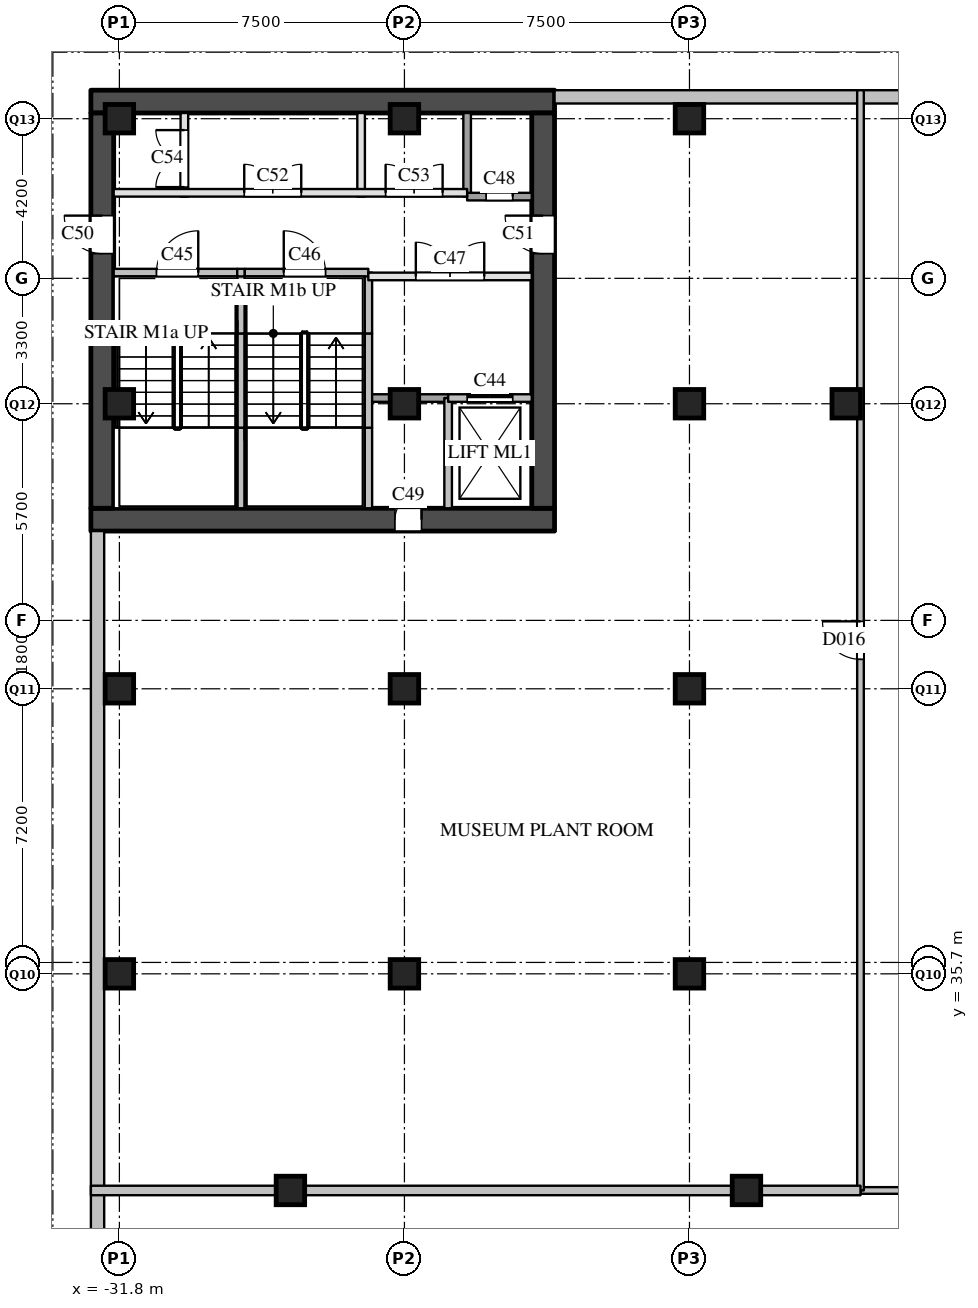
"""IFC4 building model, lengths in metres.
Left out: names, types, materials, properties, quantities, classifications, styles, units other than length and angle.
Written with IfcOpenShell. Run it as: python <this file> out.ifc"""

import sys

from ifc_helpers import new_model, si_unit, direction, frame, frame_2d, origin, origin_2d, place, context, subcontext, project, spatial, rectangle, extrude, element, fill, save


model = new_model("IFC4")
c1 = context("Model", 3, precision=1e-05, world=origin(), true_north=direction((0.0, 1.0)))
c2 = subcontext(c1, "Body", "Model", "MODEL_VIEW")
j1 = project(units=[si_unit("LENGTHUNIT", "METRE"), si_unit("PLANEANGLEUNIT", "RADIAN")], contexts=[c1])
p1 = place(None, origin())
s1 = spatial("IfcSite", under=j1, at=p1, CompositionType="ELEMENT")
p2 = place(p1, origin())
s2 = spatial("IfcBuilding", under=s1, at=p2, CompositionType="ELEMENT")
p3 = place(p2, frame((0.0, 0.0, -6.0)))
s3 = spatial("IfcBuildingStorey", under=s2, at=p3, CompositionType="ELEMENT", Elevation=-6.0)
p4 = place(p3, frame((-32.375, -20.95, 0.0), z_axis=(0.0, 0.0, 1.0), x_axis=(0.0, 1.0, 0.0)))
e1 = element("IfcWall", 1, at=p4, inside=s3, PredefinedType="SOLIDWALL", context=c2, shape_type="SweptSolid", body=[
    extrude(rectangle(XDim=68.3, YDim=0.35, at=frame_2d((34.15, 0.0))), origin(), (0.0, 0.0, 1.0), 5.59),
])
p5 = place(p3, frame((-20.35, 58.775, 0.0), z_axis=(0.0, 0.0, 1.0), x_axis=(1.0, 0.0, 0.0)))
e2 = element("IfcWall", 2, at=p5, inside=s3, PredefinedType="SOLIDWALL", context=c2, shape_type="SweptSolid", body=[
    extrude(rectangle(XDim=19.3, YDim=0.35, at=frame_2d((9.65, 0.0))), origin(), (0.0, 0.0, 1.0), 5.59),
])
for number, where, z_axis, x_axis in (
    (3, (-31.8, 35.7, 0.0), (0.0, 0.0, 1.0), (1.0, 0.0, 0.0)),
    (4, (-31.8, 43.2, 0.0), (0.0, 0.0, 1.0), (1.0, 0.0, 0.0)),
    (5, (-31.8, 50.7, 0.0), (0.0, 0.0, 1.0), (1.0, 0.0, 0.0)),
    (6, (-31.8, 58.2, 0.0), (0.0, 0.0, 1.0), (1.0, 0.0, 0.0)),
    (7, (-24.3, 35.7, 0.0), (0.0, 0.0, 1.0), (1.0, 0.0, 0.0)),
    (8, (-24.3, 43.2, 0.0), (0.0, 0.0, 1.0), (1.0, 0.0, 0.0)),
    (9, (-24.3, 50.7, 0.0), (0.0, 0.0, 1.0), (1.0, 0.0, 0.0)),
    (10, (-24.3, 58.2, 0.0), (0.0, 0.0, 1.0), (1.0, 0.0, 0.0)),
    (11, (-16.8, 35.7, 0.0), (0.0, 0.0, 1.0), (1.0, 0.0, 0.0)),
    (12, (-16.8, 43.2, 0.0), (0.0, 0.0, 1.0), (1.0, 0.0, 0.0)),
    (13, (-16.8, 50.7, 0.0), (0.0, 0.0, 1.0), (1.0, 0.0, 0.0)),
    (14, (-16.8, 58.2, 0.0), (0.0, 0.0, 1.0), (1.0, 0.0, 0.0)),
    (15, (-15.3, 30.0, 0.0), (0.0, 0.0, 1.0), (1.0, 0.0, 0.0)),
    (16, (-27.3, 30.0, 0.0), (0.0, 0.0, 1.0), (1.0, 0.0, 0.0)),
    (17, (-12.675, 50.7, 0.0), (0.0, 0.0, 1.0), (1.0, 0.0, 0.0)),
):
    element("IfcColumn", number, at=place(p3, frame(where, z_axis=z_axis, x_axis=x_axis)), inside=s3, PredefinedType="COLUMN", context=c2, shape_type="SweptSolid", body=[
        extrude(rectangle(XDim=0.75, YDim=0.75, at=origin_2d()), origin(), (0.0, 0.0, 1.0), 6.0),
    ])
p6 = place(p3, frame((-32.55, 47.65, 0.0), z_axis=(0.0, 0.0, 1.0), x_axis=(1.0, 0.0, 0.0)))
e18 = element("IfcWall", 18, at=p6, inside=s3, PredefinedType="SHEAR", context=c2, shape_type="SweptSolid", body=[
    extrude(rectangle(XDim=12.2, YDim=0.6, at=frame_2d((6.1, 0.0))), origin(), (0.0, 0.0, 1.0), 5.59),
])
p7 = place(p6, frame((8.0, 0.0, 0.0)))
e19 = element("IfcOpeningElement", 19, at=p7, cuts=e18, PredefinedType="OPENING", context=c2, shape_type="SweptSolid", body=[
    extrude(rectangle(XDim=0.7, YDim=2.1, at=frame_2d((0.35, 1.05))), frame((0.0, 0.31, 0.0), z_axis=(0.0, -1.0, 0.0), x_axis=(1.0, 0.0, 0.0)), (0.0, 0.0, 1.0), 0.62),
])
p8 = place(p3, frame((-32.55, 58.65, 0.0), z_axis=(0.0, 0.0, 1.0), x_axis=(1.0, 0.0, 0.0)))
e20 = element("IfcWall", 20, at=p8, inside=s3, PredefinedType="SHEAR", context=c2, shape_type="SweptSolid", body=[
    extrude(rectangle(XDim=12.2, YDim=0.6, at=frame_2d((6.1, 0.0))), origin(), (0.0, 0.0, 1.0), 5.59),
])
p9 = place(p3, frame((-32.25, 47.95, 0.0), z_axis=(0.0, 0.0, 1.0), x_axis=(0.0, 1.0, 0.0)))
e21 = element("IfcWall", 21, at=p9, inside=s3, PredefinedType="SHEAR", context=c2, shape_type="SweptSolid", body=[
    extrude(rectangle(XDim=10.4, YDim=0.6, at=frame_2d((5.2, 0.0))), origin(), (0.0, 0.0, 1.0), 5.59),
])
p10 = place(p9, frame((6.7, 0.0, 0.0)))
e22 = element("IfcOpeningElement", 22, at=p10, cuts=e21, PredefinedType="OPENING", context=c2, shape_type="SweptSolid", body=[
    extrude(rectangle(XDim=1.0, YDim=2.1, at=frame_2d((0.5, 1.05))), frame((0.0, 0.31, 0.0), z_axis=(0.0, -1.0, 0.0), x_axis=(1.0, 0.0, 0.0)), (0.0, 0.0, 1.0), 0.62),
])
p11 = place(p3, frame((-20.65, 47.95, 0.0), z_axis=(0.0, 0.0, 1.0), x_axis=(0.0, 1.0, 0.0)))
e23 = element("IfcWall", 23, at=p11, inside=s3, PredefinedType="SHEAR", context=c2, shape_type="SweptSolid", body=[
    extrude(rectangle(XDim=10.4, YDim=0.6, at=frame_2d((5.2, 0.0))), origin(), (0.0, 0.0, 1.0), 5.59),
])
p12 = place(p11, frame((6.7, 0.0, 0.0)))
e24 = element("IfcOpeningElement", 24, at=p12, cuts=e23, PredefinedType="OPENING", context=c2, shape_type="SweptSolid", body=[
    extrude(rectangle(XDim=1.0, YDim=2.1, at=frame_2d((0.5, 1.05))), frame((0.0, 0.31, 0.0), z_axis=(0.0, -1.0, 0.0), x_axis=(1.0, 0.0, 0.0)), (0.0, 0.0, 1.0), 0.62),
])
p13 = place(p3, frame((-30.09, 56.15, 0.0), z_axis=(0.0, 0.0, 1.0), x_axis=(0.0, 1.0, 0.0)))
e25 = element("IfcWall", 25, at=p13, inside=s3, PredefinedType="PARTITIONING", context=c2, shape_type="SweptSolid", body=[
    extrude(rectangle(XDim=2.2, YDim=0.2, at=frame_2d((1.1, 0.0))), origin(), (0.0, 0.0, 1.0), 5.59),
])
p14 = place(p13, frame((0.25, 0.0, 0.0)))
e26 = element("IfcOpeningElement", 26, at=p14, cuts=e25, PredefinedType="OPENING", context=c2, shape_type="SweptSolid", body=[
    extrude(rectangle(XDim=1.5, YDim=2.1, at=frame_2d((0.75, 1.05))), frame((0.0, 0.11, 0.0), z_axis=(0.0, -1.0, 0.0), x_axis=(1.0, 0.0, 0.0)), (0.0, 0.0, 1.0), 0.22),
])
p15 = place(p3, frame((-28.6, 47.95, 0.0), z_axis=(0.0, 0.0, 1.0), x_axis=(0.0, 1.0, 0.0)))
e27 = element("IfcWall", 27, at=p15, inside=s3, PredefinedType="SOLIDWALL", context=c2, shape_type="SweptSolid", body=[
    extrude(rectangle(XDim=2.12, YDim=0.2, at=frame_2d((1.06, 0.0))), origin(), (0.0, 0.0, 1.0), 5.59),
])
p16 = place(p3, frame((-28.6, 50.07, 0.0), z_axis=(0.0, 0.0, 1.0), x_axis=(0.0, 1.0, 0.0)))
e28 = element("IfcWall", 28, at=p16, inside=s3, PredefinedType="SOLIDWALL", context=c2, shape_type="SweptSolid", body=[
    extrude(rectangle(XDim=2.48, YDim=0.2, at=frame_2d((1.24, 0.0))), origin(), (0.0, 0.0, 1.0), 5.59),
])
p17 = place(p3, frame((-28.6, 52.55, 0.0), z_axis=(0.0, 0.0, 1.0), x_axis=(0.0, 1.0, 0.0)))
e29 = element("IfcWall", 29, at=p17, inside=s3, PredefinedType="SOLIDWALL", context=c2, shape_type="SweptSolid", body=[
    extrude(rectangle(XDim=1.6, YDim=0.2, at=frame_2d((0.8, 0.0))), origin(), (0.0, 0.0, 1.0), 5.59),
])
p18 = place(p3, frame((-25.44, 56.15, 0.0), z_axis=(0.0, 0.0, 1.0), x_axis=(0.0, 1.0, 0.0)))
e30 = element("IfcWall", 30, at=p18, inside=s3, PredefinedType="PARTITIONING", context=c2, shape_type="SweptSolid", body=[
    extrude(rectangle(XDim=2.2, YDim=0.2, at=frame_2d((1.1, 0.0))), origin(), (0.0, 0.0, 1.0), 5.59),
])
p19 = place(p3, frame((-25.25, 47.95, 0.0), z_axis=(0.0, 0.0, 1.0), x_axis=(0.0, 1.0, 0.0)))
e31 = element("IfcWall", 31, at=p19, inside=s3, PredefinedType="SOLIDWALL", context=c2, shape_type="SweptSolid", body=[
    extrude(rectangle(XDim=2.12, YDim=0.2, at=frame_2d((1.06, 0.0))), origin(), (0.0, 0.0, 1.0), 5.59),
])
p20 = place(p3, frame((-25.25, 50.07, 0.0), z_axis=(0.0, 0.0, 1.0), x_axis=(0.0, 1.0, 0.0)))
e32 = element("IfcWall", 32, at=p20, inside=s3, PredefinedType="SOLIDWALL", context=c2, shape_type="SweptSolid", body=[
    extrude(rectangle(XDim=2.48, YDim=0.2, at=frame_2d((1.24, 0.0))), origin(), (0.0, 0.0, 1.0), 5.59),
])
p21 = place(p3, frame((-25.25, 52.55, 0.0), z_axis=(0.0, 0.0, 1.0), x_axis=(0.0, 1.0, 0.0)))
e33 = element("IfcWall", 33, at=p21, inside=s3, PredefinedType="SOLIDWALL", context=c2, shape_type="SweptSolid", body=[
    extrude(rectangle(XDim=1.6, YDim=0.2, at=frame_2d((0.8, 0.0))), origin(), (0.0, 0.0, 1.0), 5.59),
])
p22 = place(p3, frame((-23.15, 47.95, 0.0), z_axis=(0.0, 0.0, 1.0), x_axis=(0.0, 1.0, 0.0)))
e34 = element("IfcWall", 34, at=p22, inside=s3, PredefinedType="SOLIDWALL", context=c2, shape_type="SweptSolid", body=[
    extrude(rectangle(XDim=2.9, YDim=0.2, at=frame_2d((1.45, 0.0))), origin(), (0.0, 0.0, 1.0), 5.59),
])
p23 = place(p3, frame((-22.65, 56.15, 0.0), z_axis=(0.0, 0.0, 1.0), x_axis=(0.0, 1.0, 0.0)))
e35 = element("IfcWall", 35, at=p23, inside=s3, PredefinedType="SOLIDWALL", context=c2, shape_type="SweptSolid", body=[
    extrude(rectangle(XDim=2.2, YDim=0.2, at=frame_2d((1.1, 0.0))), origin(), (0.0, 0.0, 1.0), 5.59),
])
p24 = place(p3, frame((-23.15, 50.85, 0.0), z_axis=(0.0, 0.0, 1.0), x_axis=(1.0, 0.0, 0.0)))
e36 = element("IfcWall", 36, at=p24, inside=s3, PredefinedType="SOLIDWALL", context=c2, shape_type="SweptSolid", body=[
    extrude(rectangle(XDim=2.2, YDim=0.2, at=frame_2d((1.1, 0.0))), origin(), (0.0, 0.0, 1.0), 5.59),
])
p25 = place(p24, frame((0.5, 0.0, 0.0)))
e37 = element("IfcOpeningElement", 37, at=p25, cuts=e36, PredefinedType="OPENING", context=c2, shape_type="SweptSolid", body=[
    extrude(rectangle(XDim=1.2, YDim=2.1, at=frame_2d((0.6, 1.05))), frame((0.0, 0.11, 0.0), z_axis=(0.0, -1.0, 0.0), x_axis=(1.0, 0.0, 0.0)), (0.0, 0.0, 1.0), 0.22),
])
p26 = place(p3, frame((-25.25, 50.85, 0.0), z_axis=(0.0, 0.0, 1.0), x_axis=(1.0, 0.0, 0.0)))
e38 = element("IfcWall", 38, at=p26, inside=s3, PredefinedType="SOLIDWALL", context=c2, shape_type="SweptSolid", body=[
    extrude(rectangle(XDim=2.1, YDim=0.2, at=frame_2d((1.05, 0.0))), origin(), (0.0, 0.0, 1.0), 5.59),
])
p27 = place(p3, frame((-25.25, 54.05, 0.0), z_axis=(0.0, 0.0, 1.0), x_axis=(1.0, 0.0, 0.0)))
e39 = element("IfcWall", 39, at=p27, inside=s3, PredefinedType="PARTITIONING", context=c2, shape_type="SweptSolid", body=[
    extrude(rectangle(XDim=4.3, YDim=0.2, at=frame_2d((2.15, 0.0))), origin(), (0.0, 0.0, 1.0), 5.59),
])
p28 = place(p27, frame((1.25, 0.0, 0.0)))
e40 = element("IfcOpeningElement", 40, at=p28, cuts=e39, PredefinedType="OPENING", context=c2, shape_type="SweptSolid", body=[
    extrude(rectangle(XDim=1.8, YDim=2.1, at=frame_2d((0.9, 1.05))), frame((0.0, 0.11, 0.0), z_axis=(0.0, -1.0, 0.0), x_axis=(1.0, 0.0, 0.0)), (0.0, 0.0, 1.0), 0.22),
])
p29 = place(p3, frame((-31.95, 54.15, 0.0), z_axis=(0.0, 0.0, 1.0), x_axis=(1.0, 0.0, 0.0)))
e41 = element("IfcWall", 41, at=p29, inside=s3, PredefinedType="SOLIDWALL", context=c2, shape_type="SweptSolid", body=[
    extrude(rectangle(XDim=3.25, YDim=0.2, at=frame_2d((1.625, 0.0))), origin(), (0.0, 0.0, 1.0), 5.59),
])
p30 = place(p29, frame((1.125, 0.0, 0.0)))
e42 = element("IfcOpeningElement", 42, at=p30, cuts=e41, PredefinedType="OPENING", context=c2, shape_type="SweptSolid", body=[
    extrude(rectangle(XDim=1.1, YDim=2.1, at=frame_2d((0.55, 1.05))), frame((0.0, 0.11, 0.0), z_axis=(0.0, -1.0, 0.0), x_axis=(1.0, 0.0, 0.0)), (0.0, 0.0, 1.0), 0.22),
])
p31 = place(p3, frame((-28.7, 54.15, 0.0), z_axis=(0.0, 0.0, 1.0), x_axis=(1.0, 0.0, 0.0)))
e43 = element("IfcWall", 43, at=p31, inside=s3, PredefinedType="SOLIDWALL", context=c2, shape_type="SweptSolid", body=[
    extrude(rectangle(XDim=0.2, YDim=0.2, at=frame_2d((0.1, 0.0))), origin(), (0.0, 0.0, 1.0), 5.59),
])
p32 = place(p3, frame((-28.5, 54.15, 0.0), z_axis=(0.0, 0.0, 1.0), x_axis=(1.0, 0.0, 0.0)))
e44 = element("IfcWall", 44, at=p32, inside=s3, PredefinedType="SOLIDWALL", context=c2, shape_type="SweptSolid", body=[
    extrude(rectangle(XDim=3.25, YDim=0.2, at=frame_2d((1.625, 0.0))), origin(), (0.0, 0.0, 1.0), 5.59),
])
p33 = place(p32, frame((1.025, 0.0, 0.0)))
e45 = element("IfcOpeningElement", 45, at=p33, cuts=e44, PredefinedType="OPENING", context=c2, shape_type="SweptSolid", body=[
    extrude(rectangle(XDim=1.1, YDim=2.1, at=frame_2d((0.55, 1.05))), frame((0.0, 0.11, 0.0), z_axis=(0.0, -1.0, 0.0), x_axis=(1.0, 0.0, 0.0)), (0.0, 0.0, 1.0), 0.22),
])
p34 = place(p3, frame((-31.95, 56.25, 0.0), z_axis=(0.0, 0.0, 1.0), x_axis=(1.0, 0.0, 0.0)))
e46 = element("IfcWall", 46, at=p34, inside=s3, PredefinedType="PARTITIONING", context=c2, shape_type="SweptSolid", body=[
    extrude(rectangle(XDim=9.3, YDim=0.2, at=frame_2d((4.65, 0.0))), origin(), (0.0, 0.0, 1.0), 5.59),
])
p35 = place(p34, frame((3.435, 0.0, 0.0)))
e47 = element("IfcOpeningElement", 47, at=p35, cuts=e46, PredefinedType="OPENING", context=c2, shape_type="SweptSolid", body=[
    extrude(rectangle(XDim=1.5, YDim=2.1, at=frame_2d((0.75, 1.05))), frame((0.0, 0.11, 0.0), z_axis=(0.0, -1.0, 0.0), x_axis=(1.0, 0.0, 0.0)), (0.0, 0.0, 1.0), 0.22),
])
p36 = place(p34, frame((7.155, 0.0, 0.0)))
e48 = element("IfcOpeningElement", 48, at=p36, cuts=e46, PredefinedType="OPENING", context=c2, shape_type="SweptSolid", body=[
    extrude(rectangle(XDim=1.5, YDim=2.1, at=frame_2d((0.75, 1.05))), frame((0.0, 0.11, 0.0), z_axis=(0.0, -1.0, 0.0), x_axis=(1.0, 0.0, 0.0)), (0.0, 0.0, 1.0), 0.22),
])
p37 = place(p3, frame((-22.65, 56.15, 0.0), z_axis=(0.0, 0.0, 1.0), x_axis=(1.0, 0.0, 0.0)))
e49 = element("IfcWall", 49, at=p37, inside=s3, PredefinedType="SOLIDWALL", context=c2, shape_type="SweptSolid", body=[
    extrude(rectangle(XDim=1.7, YDim=0.2, at=frame_2d((0.85, 0.0))), origin(), (0.0, 0.0, 1.0), 5.59),
])
p38 = place(p37, frame((0.5, 0.0, 0.0)))
e50 = element("IfcOpeningElement", 50, at=p38, cuts=e49, PredefinedType="OPENING", context=c2, shape_type="SweptSolid", body=[
    extrude(rectangle(XDim=0.7, YDim=2.1, at=frame_2d((0.35, 1.05))), frame((0.0, 0.11, 0.0), z_axis=(0.0, -1.0, 0.0), x_axis=(1.0, 0.0, 0.0)), (0.0, 0.0, 1.0), 0.22),
])
p39 = place(p3, frame((-12.3, 30.0, 0.0), z_axis=(0.0, 0.0, 1.0), x_axis=(1.0, 0.0, 0.0)))
e51 = element("IfcWall", 51, at=p39, inside=s3, PredefinedType="PARTITIONING", context=c2, shape_type="SweptSolid", body=[
    extrude(rectangle(XDim=8.25, YDim=0.175, at=frame_2d((4.125, 0.0))), origin(), (0.0, 0.0, 1.0), 4.79),
])
p40 = place(p3, frame((-12.3, 30.0, 0.0), z_axis=(0.0, 0.0, 1.0), x_axis=(0.0, 1.0, 0.0)))
e52 = element("IfcWall", 52, at=p40, inside=s3, PredefinedType="PARTITIONING", context=c2, shape_type="SweptSolid", body=[
    extrude(rectangle(XDim=28.95, YDim=0.175, at=frame_2d((14.475, 0.0))), origin(), (0.0, 0.0, 1.0), 4.79),
])
p41 = place(p40, frame((13.975, 0.0, 0.0)))
e53 = element("IfcOpeningElement", 53, at=p41, cuts=e52, PredefinedType="OPENING", context=c2, shape_type="SweptSolid", body=[
    extrude(rectangle(XDim=1.0, YDim=2.1, at=frame_2d((0.5, 1.05))), frame((0.0, 0.097, 0.0), z_axis=(0.0, -1.0, 0.0), x_axis=(1.0, 0.0, 0.0)), (0.0, 0.0, 1.0), 0.195),
])
p42 = place(p3, frame((-32.55, 30.0, 0.0), z_axis=(0.0, 0.0, 1.0), x_axis=(1.0, 0.0, 0.0)))
e54 = element("IfcWall", 54, at=p42, inside=s3, PredefinedType="PARTITIONING", context=c2, shape_type="SweptSolid", body=[
    extrude(rectangle(XDim=20.25, YDim=0.25, at=frame_2d((10.125, 0.0))), origin(), (0.0, 0.0, 1.0), 4.79),
])
p43 = place(p25, origin())
e55 = element("IfcDoor", 55, at=p43, inside=s3, OperationType="SLIDING_TO_LEFT", PredefinedType="DOOR", context=c2, shape_type="SweptSolid", body=[
    extrude(rectangle(XDim=1.2, YDim=2.1, at=frame_2d((0.6, 1.05))), frame((0.0, 0.025, 0.0), z_axis=(0.0, -1.0, 0.0), x_axis=(1.0, 0.0, 0.0)), (0.0, 0.0, 1.0), 0.05),
])
fill(e37, e55)
p44 = place(p30, origin())
e56 = element("IfcDoor", 56, at=p44, inside=s3, OperationType="SINGLE_SWING_RIGHT", PredefinedType="DOOR", context=c2, shape_type="SweptSolid", body=[
    extrude(rectangle(XDim=1.1, YDim=2.1, at=frame_2d((0.55, 1.05))), frame((0.0, 0.025, 0.0), z_axis=(0.0, -1.0, 0.0), x_axis=(1.0, 0.0, 0.0)), (0.0, 0.0, 1.0), 0.05),
])
fill(e42, e56)
p45 = place(p33, origin())
e57 = element("IfcDoor", 57, at=p45, inside=s3, OperationType="SINGLE_SWING_LEFT", PredefinedType="DOOR", context=c2, shape_type="SweptSolid", body=[
    extrude(rectangle(XDim=1.1, YDim=2.1, at=frame_2d((0.55, 1.05))), frame((0.0, 0.025, 0.0), z_axis=(0.0, -1.0, 0.0), x_axis=(1.0, 0.0, 0.0)), (0.0, 0.0, 1.0), 0.05),
])
fill(e45, e57)
p46 = place(p28, origin())
e58 = element("IfcDoor", 58, at=p46, inside=s3, OperationType="DOUBLE_DOOR_SINGLE_SWING", PredefinedType="DOOR", context=c2, shape_type="SweptSolid", body=[
    extrude(rectangle(XDim=1.8, YDim=2.1, at=frame_2d((0.9, 1.05))), frame((0.0, 0.025, 0.0), z_axis=(0.0, -1.0, 0.0), x_axis=(1.0, 0.0, 0.0)), (0.0, 0.0, 1.0), 0.05),
])
fill(e40, e58)
p47 = place(p38, origin())
e59 = element("IfcDoor", 59, at=p47, inside=s3, OperationType="SINGLE_SWING_RIGHT", PredefinedType="DOOR", context=c2, shape_type="SweptSolid", body=[
    extrude(rectangle(XDim=0.7, YDim=2.1, at=frame_2d((0.35, 1.05))), frame((0.0, 0.025, 0.0), z_axis=(0.0, -1.0, 0.0), x_axis=(1.0, 0.0, 0.0)), (0.0, 0.0, 1.0), 0.05),
])
fill(e50, e59)
p48 = place(p7, origin())
e60 = element("IfcDoor", 60, at=p48, inside=s3, OperationType="SINGLE_SWING_RIGHT", PredefinedType="DOOR", context=c2, shape_type="SweptSolid", body=[
    extrude(rectangle(XDim=0.7, YDim=2.1, at=frame_2d((0.35, 1.05))), frame((0.0, 0.025, 0.0), z_axis=(0.0, -1.0, 0.0), x_axis=(1.0, 0.0, 0.0)), (0.0, 0.0, 1.0), 0.05),
])
fill(e19, e60)
p49 = place(p10, origin())
e61 = element("IfcDoor", 61, at=p49, inside=s3, OperationType="SINGLE_SWING_RIGHT", PredefinedType="DOOR", context=c2, shape_type="SweptSolid", body=[
    extrude(rectangle(XDim=1.0, YDim=2.1, at=frame_2d((0.5, 1.05))), frame((0.0, 0.025, 0.0), z_axis=(0.0, -1.0, 0.0), x_axis=(1.0, 0.0, 0.0)), (0.0, 0.0, 1.0), 0.05),
])
fill(e22, e61)
p50 = place(p12, origin())
e62 = element("IfcDoor", 62, at=p50, inside=s3, OperationType="SINGLE_SWING_RIGHT", PredefinedType="DOOR", context=c2, shape_type="SweptSolid", body=[
    extrude(rectangle(XDim=1.0, YDim=2.1, at=frame_2d((0.5, 1.05))), frame((0.0, 0.025, 0.0), z_axis=(0.0, -1.0, 0.0), x_axis=(1.0, 0.0, 0.0)), (0.0, 0.0, 1.0), 0.05),
])
fill(e24, e62)
p51 = place(p35, origin())
e63 = element("IfcDoor", 63, at=p51, inside=s3, OperationType="DOUBLE_DOOR_SINGLE_SWING", PredefinedType="DOOR", context=c2, shape_type="SweptSolid", body=[
    extrude(rectangle(XDim=1.5, YDim=2.1, at=frame_2d((0.75, 1.05))), frame((0.0, 0.025, 0.0), z_axis=(0.0, -1.0, 0.0), x_axis=(1.0, 0.0, 0.0)), (0.0, 0.0, 1.0), 0.05),
])
fill(e47, e63)
p52 = place(p36, origin())
e64 = element("IfcDoor", 64, at=p52, inside=s3, OperationType="DOUBLE_DOOR_SINGLE_SWING", PredefinedType="DOOR", context=c2, shape_type="SweptSolid", body=[
    extrude(rectangle(XDim=1.5, YDim=2.1, at=frame_2d((0.75, 1.05))), frame((0.0, 0.025, 0.0), z_axis=(0.0, -1.0, 0.0), x_axis=(1.0, 0.0, 0.0)), (0.0, 0.0, 1.0), 0.05),
])
fill(e48, e64)
p53 = place(p14, origin())
e65 = element("IfcDoor", 65, at=p53, inside=s3, OperationType="DOUBLE_DOOR_SINGLE_SWING", PredefinedType="DOOR", context=c2, shape_type="SweptSolid", body=[
    extrude(rectangle(XDim=1.5, YDim=2.1, at=frame_2d((0.75, 1.05))), frame((0.0, 0.025, 0.0), z_axis=(0.0, -1.0, 0.0), x_axis=(1.0, 0.0, 0.0)), (0.0, 0.0, 1.0), 0.05),
])
fill(e26, e65)
p54 = place(p41, origin())
e66 = element("IfcDoor", 66, at=p54, inside=s3, OperationType="SINGLE_SWING_RIGHT", PredefinedType="DOOR", context=c2, shape_type="SweptSolid", body=[
    extrude(rectangle(XDim=1.0, YDim=2.1, at=frame_2d((0.5, 1.05))), frame((0.0, 0.025, 0.0), z_axis=(0.0, -1.0, 0.0), x_axis=(1.0, 0.0, 0.0)), (0.0, 0.0, 1.0), 0.05),
])
fill(e53, e66)
save(model, sys.argv[1])
